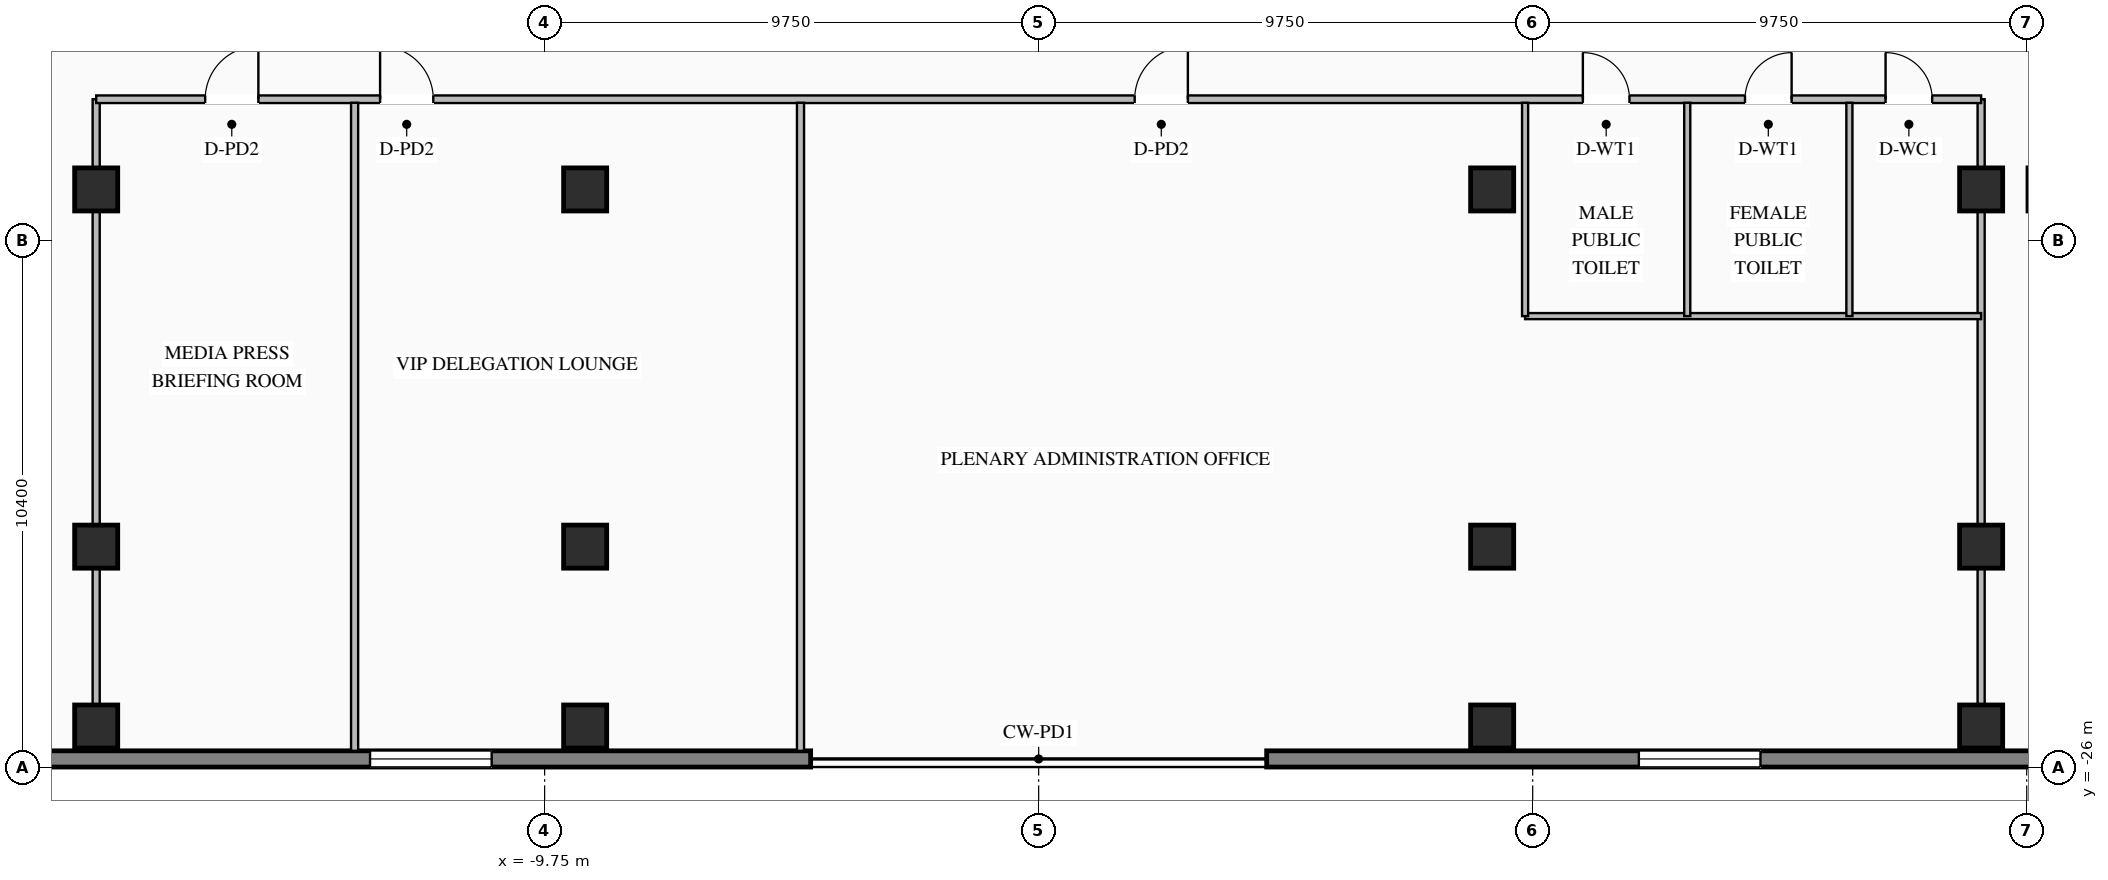
"""IFC4 building model, lengths in metres.
Left out: names, types, materials, properties, quantities, classifications, styles, units other than length and angle.
Written with IfcOpenShell. Run it as: python <this file> out.ifc"""

import sys

from ifc_helpers import new_model, si_unit, direction, frame, frame_2d, origin, origin_2d, place, context, subcontext, project, spatial, rectangle, i_section, extrude, element, fill, save


model = new_model("IFC4")
c1 = context("Model", 3, precision=1e-05, world=origin(), true_north=direction((0.0, 1.0)))
c2 = subcontext(c1, "Body", "Model", "MODEL_VIEW")
j1 = project(units=[si_unit("LENGTHUNIT", "METRE"), si_unit("PLANEANGLEUNIT", "RADIAN")], contexts=[c1])
p1 = place(None, origin())
s1 = spatial("IfcSite", under=j1, at=p1, CompositionType="ELEMENT")
p2 = place(p1, origin())
s2 = spatial("IfcBuilding", under=s1, at=p2, CompositionType="ELEMENT")
p3 = place(p2, frame((0.0, 0.0, 14.1)))
s3 = spatial("IfcBuildingStorey", under=s2, at=p3, CompositionType="ELEMENT", Elevation=14.1)
for number, where, z_axis, x_axis in (
    (1, (-18.6, -14.6, 0.0), (0.0, 0.0, 1.0), (1.0, 0.0, 0.0)),
    (2, (-8.95, -14.6, 0.0), (0.0, 0.0, 1.0), (1.0, 0.0, 0.0)),
    (3, (8.95, -14.6, 0.0), (0.0, 0.0, 1.0), (1.0, 0.0, 0.0)),
    (4, (18.6, -14.6, 0.0), (0.0, 0.0, 1.0), (1.0, 0.0, 0.0)),
    (5, (19.95, -14.6, 0.0), (0.0, 0.0, 1.0), (1.0, 0.0, 0.0)),
    (6, (-18.6, -21.65, 0.0), (0.0, 0.0, 1.0), (1.0, 0.0, 0.0)),
    (7, (-8.95, -21.65, 0.0), (0.0, 0.0, 1.0), (1.0, 0.0, 0.0)),
    (8, (8.95, -21.65, 0.0), (0.0, 0.0, 1.0), (1.0, 0.0, 0.0)),
    (9, (18.6, -21.65, 0.0), (0.0, 0.0, 1.0), (1.0, 0.0, 0.0)),
    (10, (-18.6, -25.2, 0.0), (0.0, 0.0, 1.0), (1.0, 0.0, 0.0)),
    (11, (-8.95, -25.2, 0.0), (0.0, 0.0, 1.0), (1.0, 0.0, 0.0)),
    (12, (8.95, -25.2, 0.0), (0.0, 0.0, 1.0), (1.0, 0.0, 0.0)),
    (13, (18.6, -25.2, 0.0), (0.0, 0.0, 1.0), (1.0, 0.0, 0.0)),
):
    element("IfcColumn", number, at=place(p3, frame(where, z_axis=z_axis, x_axis=x_axis)), inside=s3, PredefinedType="COLUMN", context=c2, shape_type="SweptSolid", body=[
        extrude(i_section(OverallWidth=0.85, OverallDepth=0.85, WebThickness=0.032, FlangeThickness=0.048, at=origin_2d()), origin(), (0.0, 0.0, 1.0), 4.5),
    ])
p4 = place(p3, frame((38.68, -25.84, 0.0), z_axis=(0.0, 0.0, 1.0), x_axis=(-1.0, 0.0, 0.0)))
e14 = element("IfcWall", 14, at=p4, inside=s3, PredefinedType="STANDARD", context=c2, shape_type="SweptSolid", body=[
    extrude(rectangle(XDim=34.18, YDim=0.32, at=frame_2d((17.09, 0.0))), origin(), (0.0, 0.0, 1.0), 4.23),
])
p5 = place(p4, frame((6.795, 0.0, 0.8)))
e15 = element("IfcOpeningElement", 15, at=p5, cuts=e14, PredefinedType="OPENING", context=c2, shape_type="SweptSolid", body=[
    extrude(rectangle(XDim=2.4, YDim=2.35, at=frame_2d((1.2, 1.175))), frame((0.0, 0.17, 0.0), z_axis=(0.0, -1.0, 0.0), x_axis=(1.0, 0.0, 0.0)), (0.0, 0.0, 1.0), 0.34),
])
p6 = place(p4, frame((16.44, 0.0, 0.8)))
e16 = element("IfcOpeningElement", 16, at=p6, cuts=e14, PredefinedType="OPENING", context=c2, shape_type="SweptSolid", body=[
    extrude(rectangle(XDim=2.4, YDim=2.35, at=frame_2d((1.2, 1.175))), frame((0.0, 0.17, 0.0), z_axis=(0.0, -1.0, 0.0), x_axis=(1.0, 0.0, 0.0)), (0.0, 0.0, 1.0), 0.34),
])
p7 = place(p4, frame((24.435, 0.0, 0.8)))
e17 = element("IfcOpeningElement", 17, at=p7, cuts=e14, PredefinedType="OPENING", context=c2, shape_type="SweptSolid", body=[
    extrude(rectangle(XDim=2.4, YDim=2.35, at=frame_2d((1.2, 1.175))), frame((0.0, 0.17, 0.0), z_axis=(0.0, -1.0, 0.0), x_axis=(1.0, 0.0, 0.0)), (0.0, 0.0, 1.0), 0.34),
])
p8 = place(p3, frame((-4.5, -25.84, 0.0), z_axis=(0.0, 0.0, 1.0), x_axis=(-1.0, 0.0, 0.0)))
e18 = element("IfcWall", 18, at=p8, inside=s3, PredefinedType="STANDARD", context=c2, shape_type="SweptSolid", body=[
    extrude(rectangle(XDim=34.18, YDim=0.32, at=frame_2d((17.09, 0.0))), origin(), (0.0, 0.0, 1.0), 4.23),
])
p9 = place(p8, frame((6.295, 0.0, 0.8)))
e19 = element("IfcOpeningElement", 19, at=p9, cuts=e18, PredefinedType="OPENING", context=c2, shape_type="SweptSolid", body=[
    extrude(rectangle(XDim=2.4, YDim=2.35, at=frame_2d((1.2, 1.175))), frame((0.0, 0.17, 0.0), z_axis=(0.0, -1.0, 0.0), x_axis=(1.0, 0.0, 0.0)), (0.0, 0.0, 1.0), 0.34),
])
p10 = place(p8, frame((15.34, 0.0, 0.8)))
e20 = element("IfcOpeningElement", 20, at=p10, cuts=e18, PredefinedType="OPENING", context=c2, shape_type="SweptSolid", body=[
    extrude(rectangle(XDim=2.4, YDim=2.35, at=frame_2d((1.2, 1.175))), frame((0.0, 0.17, 0.0), z_axis=(0.0, -1.0, 0.0), x_axis=(1.0, 0.0, 0.0)), (0.0, 0.0, 1.0), 0.34),
])
p11 = place(p8, frame((24.985, 0.0, 0.8)))
e21 = element("IfcOpeningElement", 21, at=p11, cuts=e18, PredefinedType="OPENING", context=c2, shape_type="SweptSolid", body=[
    extrude(rectangle(XDim=2.4, YDim=2.35, at=frame_2d((1.2, 1.175))), frame((0.0, 0.17, 0.0), z_axis=(0.0, -1.0, 0.0), x_axis=(1.0, 0.0, 0.0)), (0.0, 0.0, 1.0), 0.34),
])
for number, where, z_axis, x_axis in (
    (22, (-18.6, -25.68, 0.0), (0.0, 0.0, 1.0), (0.0, 1.0, 0.0)),
    (23, (18.6, -25.68, 0.0), (0.0, 0.0, 1.0), (0.0, 1.0, 0.0)),
):
    element("IfcWall", number, at=place(p3, frame(where, z_axis=z_axis, x_axis=x_axis)), inside=s3, PredefinedType="STANDARD", context=c2, shape_type="SweptSolid", body=[
        extrude(rectangle(XDim=12.86, YDim=0.14, at=frame_2d((6.43, 0.0))), origin(), (0.0, 0.0, 1.0), 3.525),
    ])
p12 = place(p3, frame((-18.6, -12.82, 0.0), z_axis=(0.0, 0.0, 1.0), x_axis=(1.0, 0.0, 0.0)))
e24 = element("IfcWall", 24, at=p12, inside=s3, PredefinedType="STANDARD", context=c2, shape_type="SweptSolid", body=[
    extrude(rectangle(XDim=37.2, YDim=0.15, at=frame_2d((18.6, 0.0))), origin(), (0.0, 0.0, 1.0), 4.23),
])
p13 = place(p12, frame((29.34, 0.0, 0.0)))
e25 = element("IfcOpeningElement", 25, at=p13, cuts=e24, PredefinedType="OPENING", context=c2, shape_type="SweptSolid", body=[
    extrude(rectangle(XDim=0.92, YDim=2.08, at=frame_2d((0.46, 1.04))), frame((0.0, 0.085, 0.0), z_axis=(0.0, -1.0, 0.0), x_axis=(1.0, 0.0, 0.0)), (0.0, 0.0, 1.0), 0.17),
])
p14 = place(p12, frame((32.54, 0.0, 0.0)))
e26 = element("IfcOpeningElement", 26, at=p14, cuts=e24, PredefinedType="OPENING", context=c2, shape_type="SweptSolid", body=[
    extrude(rectangle(XDim=0.92, YDim=2.08, at=frame_2d((0.46, 1.04))), frame((0.0, 0.085, 0.0), z_axis=(0.0, -1.0, 0.0), x_axis=(1.0, 0.0, 0.0)), (0.0, 0.0, 1.0), 0.17),
])
p15 = place(p12, frame((35.314, 0.0, 0.0)))
e27 = element("IfcOpeningElement", 27, at=p15, cuts=e24, PredefinedType="OPENING", context=c2, shape_type="SweptSolid", body=[
    extrude(rectangle(XDim=0.92, YDim=2.08, at=frame_2d((0.46, 1.04))), frame((0.0, 0.085, 0.0), z_axis=(0.0, -1.0, 0.0), x_axis=(1.0, 0.0, 0.0)), (0.0, 0.0, 1.0), 0.17),
])
p16 = place(p12, frame((2.151, 0.0, 0.0)))
e28 = element("IfcOpeningElement", 28, at=p16, cuts=e24, PredefinedType="OPENING", context=c2, shape_type="SweptSolid", body=[
    extrude(rectangle(XDim=1.05, YDim=2.08, at=frame_2d((0.525, 1.04))), frame((0.0, 0.085, 0.0), z_axis=(0.0, -1.0, 0.0), x_axis=(1.0, 0.0, 0.0)), (0.0, 0.0, 1.0), 0.17),
])
p17 = place(p12, frame((5.603, 0.0, 0.0)))
e29 = element("IfcOpeningElement", 29, at=p17, cuts=e24, PredefinedType="OPENING", context=c2, shape_type="SweptSolid", body=[
    extrude(rectangle(XDim=1.05, YDim=2.08, at=frame_2d((0.525, 1.04))), frame((0.0, 0.085, 0.0), z_axis=(0.0, -1.0, 0.0), x_axis=(1.0, 0.0, 0.0)), (0.0, 0.0, 1.0), 0.17),
])
p18 = place(p12, frame((20.495, 0.0, 0.0)))
e30 = element("IfcOpeningElement", 30, at=p18, cuts=e24, PredefinedType="OPENING", context=c2, shape_type="SweptSolid", body=[
    extrude(rectangle(XDim=1.05, YDim=2.08, at=frame_2d((0.525, 1.04))), frame((0.0, 0.085, 0.0), z_axis=(0.0, -1.0, 0.0), x_axis=(1.0, 0.0, 0.0)), (0.0, 0.0, 1.0), 0.17),
])
p19 = place(p3, frame((9.6, -17.1, 0.0), z_axis=(0.0, 0.0, 1.0), x_axis=(1.0, 0.0, 0.0)))
e31 = element("IfcWall", 31, at=p19, inside=s3, PredefinedType="STANDARD", context=c2, shape_type="SweptSolid", body=[
    extrude(rectangle(XDim=9.0, YDim=0.12, at=frame_2d((4.5, 0.0))), origin(), (0.0, 0.0, 1.0), 4.23),
])
for number, where, z_axis, x_axis in (
    (32, (9.6, -17.1, 0.0), (0.0, 0.0, 1.0), (0.0, 1.0, 0.0)),
    (33, (12.8, -17.1, 0.0), (0.0, 0.0, 1.0), (0.0, 1.0, 0.0)),
    (34, (16.0, -17.1, 0.0), (0.0, 0.0, 1.0), (0.0, 1.0, 0.0)),
):
    element("IfcWall", number, at=place(p3, frame(where, z_axis=z_axis, x_axis=x_axis)), inside=s3, PredefinedType="STANDARD", context=c2, shape_type="SweptSolid", body=[
        extrude(rectangle(XDim=4.21, YDim=0.12, at=frame_2d((2.105, 0.0))), origin(), (0.0, 0.0, 1.0), 4.23),
    ])
for number, where, z_axis, x_axis in (
    (35, (-13.5, -25.68, 0.0), (0.0, 0.0, 1.0), (0.0, 1.0, 0.0)),
    (36, (-4.7, -25.68, 0.0), (0.0, 0.0, 1.0), (0.0, 1.0, 0.0)),
):
    element("IfcWall", number, at=place(p3, frame(where, z_axis=z_axis, x_axis=x_axis)), inside=s3, PredefinedType="STANDARD", context=c2, shape_type="SweptSolid", body=[
        extrude(rectangle(XDim=12.79, YDim=0.14, at=frame_2d((6.395, 0.0))), origin(), (0.0, 0.0, 1.0), 4.23),
    ])
p20 = place(p7, origin())
e37 = element("IfcWindow", 37, at=p20, inside=s3, PartitioningType="DOUBLE_PANEL_VERTICAL", PredefinedType="WINDOW", context=c2, shape_type="SweptSolid", body=[
    extrude(rectangle(XDim=2.4, YDim=2.35, at=frame_2d((1.2, 1.175))), frame((0.0, 0.03, 0.0), z_axis=(0.0, -1.0, 0.0), x_axis=(1.0, 0.0, 0.0)), (0.0, 0.0, 1.0), 0.06),
])
fill(e17, e37)
p21 = place(p9, origin())
e38 = element("IfcWindow", 38, at=p21, inside=s3, PartitioningType="DOUBLE_PANEL_VERTICAL", PredefinedType="WINDOW", context=c2, shape_type="SweptSolid", body=[
    extrude(rectangle(XDim=2.4, YDim=2.35, at=frame_2d((1.2, 1.175))), frame((0.0, 0.03, 0.0), z_axis=(0.0, -1.0, 0.0), x_axis=(1.0, 0.0, 0.0)), (0.0, 0.0, 1.0), 0.06),
])
fill(e19, e38)
p22 = place(p13, origin())
e39 = element("IfcDoor", 39, at=p22, inside=s3, OperationType="SINGLE_SWING_LEFT", PredefinedType="DOOR", context=c2, shape_type="SweptSolid", body=[
    extrude(rectangle(XDim=0.92, YDim=2.08, at=frame_2d((0.46, 1.04))), frame((0.0, 0.025, 0.0), z_axis=(0.0, -1.0, 0.0), x_axis=(1.0, 0.0, 0.0)), (0.0, 0.0, 1.0), 0.05),
])
fill(e25, e39)
p23 = place(p14, origin())
e40 = element("IfcDoor", 40, at=p23, inside=s3, OperationType="SINGLE_SWING_RIGHT", PredefinedType="DOOR", context=c2, shape_type="SweptSolid", body=[
    extrude(rectangle(XDim=0.92, YDim=2.08, at=frame_2d((0.46, 1.04))), frame((0.0, 0.025, 0.0), z_axis=(0.0, -1.0, 0.0), x_axis=(1.0, 0.0, 0.0)), (0.0, 0.0, 1.0), 0.05),
])
fill(e26, e40)
p24 = place(p15, origin())
e41 = element("IfcDoor", 41, at=p24, inside=s3, OperationType="SINGLE_SWING_LEFT", PredefinedType="DOOR", context=c2, shape_type="SweptSolid", body=[
    extrude(rectangle(XDim=0.92, YDim=2.08, at=frame_2d((0.46, 1.04))), frame((0.0, 0.025, 0.0), z_axis=(0.0, -1.0, 0.0), x_axis=(1.0, 0.0, 0.0)), (0.0, 0.0, 1.0), 0.05),
])
fill(e27, e41)
p25 = place(p16, origin())
e42 = element("IfcDoor", 42, at=p25, inside=s3, OperationType="SINGLE_SWING_RIGHT", PredefinedType="DOOR", context=c2, shape_type="SweptSolid", body=[
    extrude(rectangle(XDim=1.05, YDim=2.08, at=frame_2d((0.525, 1.04))), frame((0.0, 0.025, 0.0), z_axis=(0.0, -1.0, 0.0), x_axis=(1.0, 0.0, 0.0)), (0.0, 0.0, 1.0), 0.05),
])
fill(e28, e42)
p26 = place(p17, origin())
e43 = element("IfcDoor", 43, at=p26, inside=s3, OperationType="SINGLE_SWING_LEFT", PredefinedType="DOOR", context=c2, shape_type="SweptSolid", body=[
    extrude(rectangle(XDim=1.05, YDim=2.08, at=frame_2d((0.525, 1.04))), frame((0.0, 0.025, 0.0), z_axis=(0.0, -1.0, 0.0), x_axis=(1.0, 0.0, 0.0)), (0.0, 0.0, 1.0), 0.05),
])
fill(e29, e43)
p27 = place(p18, origin())
e44 = element("IfcDoor", 44, at=p27, inside=s3, OperationType="SINGLE_SWING_RIGHT", PredefinedType="DOOR", context=c2, shape_type="SweptSolid", body=[
    extrude(rectangle(XDim=1.05, YDim=2.08, at=frame_2d((0.525, 1.04))), frame((0.0, 0.025, 0.0), z_axis=(0.0, -1.0, 0.0), x_axis=(1.0, 0.0, 0.0)), (0.0, 0.0, 1.0), 0.05),
])
fill(e30, e44)
save(model, sys.argv[1])
